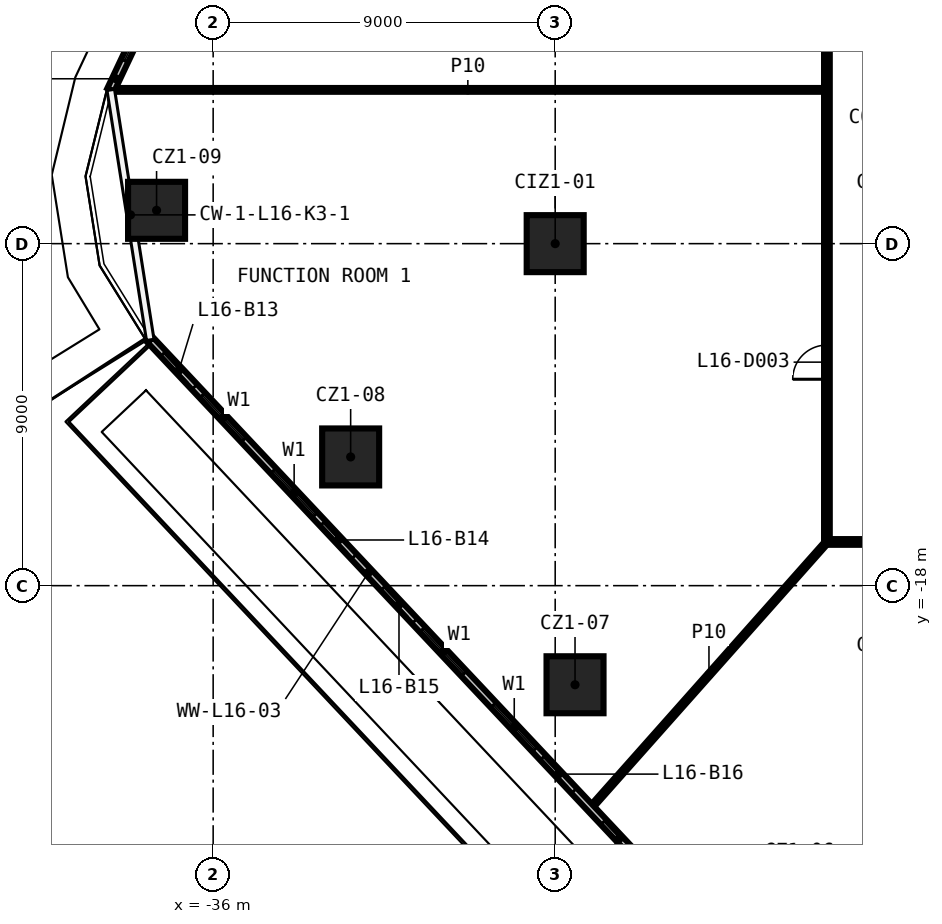
"""IFC4 building model, lengths in metres.
Left out: names, types, materials, properties, quantities, classifications, styles, units other than length and angle.
Written with IfcOpenShell. Run it as: python <this file> out.ifc"""

import sys

from ifc_helpers import new_model, si_unit, direction, frame, frame_2d, origin, origin_2d, place, context, subcontext, project, spatial, rectangle, extrude, element, fill, save


model = new_model("IFC4")
c1 = context("Model", 3, precision=1e-05, world=origin(), true_north=direction((0.0, 1.0)))
c2 = subcontext(c1, "Body", "Model", "MODEL_VIEW")
j1 = project(units=[si_unit("LENGTHUNIT", "METRE"), si_unit("PLANEANGLEUNIT", "RADIAN")], contexts=[c1])
p1 = place(None, origin())
s1 = spatial("IfcSite", under=j1, at=p1, CompositionType="ELEMENT")
p2 = place(p1, origin())
s2 = spatial("IfcBuilding", under=s1, at=p2, CompositionType="ELEMENT")
p3 = place(p2, frame((0.0, 0.0, 81.0)))
s3 = spatial("IfcBuildingStorey", under=s2, at=p3, CompositionType="ELEMENT", Elevation=81.0)
for number, where, z_axis, x_axis in (
    (1, (-26.478, -20.608, 0.0), (0.0, 0.0, 1.0), (1.0, 0.0, 0.0)),
    (2, (-32.382, -14.613, 0.0), (0.0, 0.0, 1.0), (1.0, 0.0, 0.0)),
    (3, (-37.489, -8.123, 0.0), (0.0, 0.0, 1.0), (1.0, 0.0, 0.0)),
    (4, (-27.0, -9.0, 0.0), (0.0, 0.0, 1.0), (1.0, 0.0, 0.0)),
):
    element("IfcColumn", number, at=place(p3, frame(where, z_axis=z_axis, x_axis=x_axis)), inside=s3, PredefinedType="COLUMN", context=c2, shape_type="SweptSolid", body=[
        extrude(rectangle(XDim=1.5, YDim=1.5, at=origin_2d()), origin(), (0.0, 0.0, 1.0), 3.3),
    ])
p4 = place(p3, frame((19.925, -16.85, 0.0), z_axis=(0.0, 0.0, 1.0), x_axis=(-1.0, 0.0, 0.0)))
e5 = element("IfcWall", 5, at=p4, inside=s3, PredefinedType="PARTITIONING", context=c2, shape_type="SweptSolid", body=[
    extrude(rectangle(XDim=39.85, YDim=0.15, at=frame_2d((19.925, 0.0))), origin(), (0.0, 0.0, 1.0), 3.3),
])
p5 = place(p4, frame((35.06, 0.0, 0.0)))
e6 = element("IfcOpeningElement", 6, at=p5, cuts=e5, PredefinedType="OPENING", context=c2, shape_type="SweptSolid", body=[
    extrude(rectangle(XDim=0.9, YDim=2.1, at=frame_2d((0.45, 1.05))), frame((0.0, 0.085, 0.0), z_axis=(0.0, -1.0, 0.0), x_axis=(1.0, 0.0, 0.0)), (0.0, 0.0, 1.0), 0.17),
])
p6 = place(p4, frame((30.967, 0.0, 0.0)))
e7 = element("IfcOpeningElement", 7, at=p6, cuts=e5, PredefinedType="OPENING", context=c2, shape_type="SweptSolid", body=[
    extrude(rectangle(XDim=1.0, YDim=2.1, at=frame_2d((0.5, 1.05))), frame((0.0, 0.085, 0.0), z_axis=(0.0, -1.0, 0.0), x_axis=(1.0, 0.0, 0.0)), (0.0, 0.0, 1.0), 0.17),
])
p7 = place(p4, frame((21.934, 0.0, 0.0)))
e8 = element("IfcOpeningElement", 8, at=p7, cuts=e5, PredefinedType="OPENING", context=c2, shape_type="SweptSolid", body=[
    extrude(rectangle(XDim=0.9, YDim=2.1, at=frame_2d((0.45, 1.05))), frame((0.0, 0.085, 0.0), z_axis=(0.0, -1.0, 0.0), x_axis=(1.0, 0.0, 0.0)), (0.0, 0.0, 1.0), 0.17),
])
p8 = place(p4, frame((3.879, 0.0, 0.0)))
e9 = element("IfcOpeningElement", 9, at=p8, cuts=e5, PredefinedType="OPENING", context=c2, shape_type="SweptSolid", body=[
    extrude(rectangle(XDim=0.9, YDim=2.1, at=frame_2d((0.45, 1.05))), frame((0.0, 0.085, 0.0), z_axis=(0.0, -1.0, 0.0), x_axis=(1.0, 0.0, 0.0)), (0.0, 0.0, 1.0), 0.17),
])
p9 = place(p3, frame((-38.672, -4.954, 0.0), z_axis=(0.0, 0.0, 1.0), x_axis=(1.0, 0.0, 0.0)))
e10 = element("IfcWall", 10, at=p9, inside=s3, PredefinedType="PARTITIONING", context=c2, shape_type="SweptSolid", body=[
    extrude(rectangle(XDim=18.747, YDim=0.1, at=frame_2d((9.374, 0.0))), origin(), (0.0, 0.0, 1.0), 3.3),
])
p10 = place(p3, frame((-26.058, -23.84, 0.0), z_axis=(0.0, 0.0, 1.0), x_axis=(0.664057412605, 0.747681585145, 0.0)))
e11 = element("IfcWall", 11, at=p10, inside=s3, PredefinedType="PARTITIONING", context=c2, shape_type="SweptSolid", body=[
    extrude(rectangle(XDim=9.348, YDim=0.1, at=frame_2d((4.674, 0.0))), origin(), (0.0, 0.0, 1.0), 3.3),
])
p11 = place(p3, frame((-19.85, -16.775, 0.0), z_axis=(0.0, 0.0, 1.0), x_axis=(0.0, 1.0, 0.0)))
e12 = element("IfcWall", 12, at=p11, inside=s3, PredefinedType="PARTITIONING", context=c2, shape_type="SweptSolid", body=[
    extrude(rectangle(XDim=33.55, YDim=0.15, at=frame_2d((16.775, 0.0))), origin(), (0.0, 0.0, 1.0), 3.3),
])
p12 = place(p11, frame((13.332, 0.0, 0.0)))
e13 = element("IfcOpeningElement", 13, at=p12, cuts=e12, PredefinedType="OPENING", context=c2, shape_type="SweptSolid", body=[
    extrude(rectangle(XDim=1.0, YDim=2.1, at=frame_2d((0.5, 1.05))), frame((0.0, 0.085, 0.0), z_axis=(0.0, -1.0, 0.0), x_axis=(1.0, 0.0, 0.0)), (0.0, 0.0, 1.0), 0.17),
])
p13 = place(p11, frame((4.207, 0.0, 0.0)))
e14 = element("IfcOpeningElement", 14, at=p13, cuts=e12, PredefinedType="OPENING", context=c2, shape_type="SweptSolid", body=[
    extrude(rectangle(XDim=0.9, YDim=2.1, at=frame_2d((0.45, 1.05))), frame((0.0, 0.085, 0.0), z_axis=(0.0, -1.0, 0.0), x_axis=(1.0, 0.0, 0.0)), (0.0, 0.0, 1.0), 0.17),
])
p14 = place(p11, frame((21.389, 0.0, 0.0)))
e15 = element("IfcOpeningElement", 15, at=p14, cuts=e12, PredefinedType="OPENING", context=c2, shape_type="SweptSolid", body=[
    extrude(rectangle(XDim=1.0, YDim=2.1, at=frame_2d((0.5, 1.05))), frame((0.0, 0.085, 0.0), z_axis=(0.0, -1.0, 0.0), x_axis=(1.0, 0.0, 0.0)), (0.0, 0.0, 1.0), 0.17),
])
p15 = place(p3, frame((-36.794, -0.933, 0.0), z_axis=(0.0, 0.0, 1.0), x_axis=(-0.427189555154, -0.904162089433, 0.0)))
e16 = element("IfcWall", 16, at=p15, inside=s3, PredefinedType="SOLIDWALL", context=c2, shape_type="SweptSolid", body=[
    extrude(rectangle(XDim=4.448, YDim=0.2, at=frame_2d((2.224, 0.0))), origin(), (0.0, 0.0, 1.0), 3.3),
])
p16 = place(p15, frame((2.0, 0.0, 0.6)))
e17 = element("IfcOpeningElement", 17, at=p16, cuts=e16, PredefinedType="OPENING", context=c2, shape_type="SweptSolid", body=[
    extrude(rectangle(XDim=1.6, YDim=2.4, at=frame_2d((0.8, 1.2))), frame((0.0, 0.11, 0.0), z_axis=(0.0, -1.0, 0.0), x_axis=(1.0, 0.0, 0.0)), (0.0, 0.0, 1.0), 0.22),
])
p17 = place(p15, frame((0.5, 0.0, 0.0)))
e18 = element("IfcOpeningElement", 18, at=p17, cuts=e16, PredefinedType="OPENING", context=c2, shape_type="SweptSolid", body=[
    extrude(rectangle(XDim=1.2, YDim=2.4, at=frame_2d((0.6, 1.2))), frame((0.0, 0.11, 0.0), z_axis=(0.0, -1.0, 0.0), x_axis=(1.0, 0.0, 0.0)), (0.0, 0.0, 1.0), 0.22),
])
p18 = place(p3, frame((-37.656, -11.532, 0.0), z_axis=(0.0, 0.0, 1.0), x_axis=(0.684960405986, -0.728580292234, 0.0)))
e19 = element("IfcWall", 19, at=p18, inside=s3, PredefinedType="SOLIDWALL", context=c2, shape_type="SweptSolid", body=[
    extrude(rectangle(XDim=21.14, YDim=0.2, at=frame_2d((10.57, 0.0))), origin(), (0.0, 0.0, 1.0), 3.3),
])
p19 = place(p18, frame((2.0, 0.0, 0.6)))
e20 = element("IfcOpeningElement", 20, at=p19, cuts=e19, PredefinedType="OPENING", context=c2, shape_type="SweptSolid", body=[
    extrude(rectangle(XDim=1.6, YDim=2.4, at=frame_2d((0.8, 1.2))), frame((0.0, 0.11, 0.0), z_axis=(0.0, -1.0, 0.0), x_axis=(1.0, 0.0, 0.0)), (0.0, 0.0, 1.0), 0.22),
])
p20 = place(p18, frame((0.5, 0.0, 0.0)))
e21 = element("IfcOpeningElement", 21, at=p20, cuts=e19, PredefinedType="OPENING", context=c2, shape_type="SweptSolid", body=[
    extrude(rectangle(XDim=1.2, YDim=2.4, at=frame_2d((0.6, 1.2))), frame((0.0, 0.11, 0.0), z_axis=(0.0, -1.0, 0.0), x_axis=(1.0, 0.0, 0.0)), (0.0, 0.0, 1.0), 0.22),
])
p21 = place(p18, frame((4.728, 0.0, 0.6)))
e22 = element("IfcOpeningElement", 22, at=p21, cuts=e19, PredefinedType="OPENING", context=c2, shape_type="SweptSolid", body=[
    extrude(rectangle(XDim=1.6, YDim=2.4, at=frame_2d((0.8, 1.2))), frame((0.0, 0.11, 0.0), z_axis=(0.0, -1.0, 0.0), x_axis=(1.0, 0.0, 0.0)), (0.0, 0.0, 1.0), 0.22),
])
p22 = place(p18, frame((6.628, 0.0, 0.0)))
e23 = element("IfcOpeningElement", 23, at=p22, cuts=e19, PredefinedType="OPENING", context=c2, shape_type="SweptSolid", body=[
    extrude(rectangle(XDim=1.2, YDim=2.4, at=frame_2d((0.6, 1.2))), frame((0.0, 0.11, 0.0), z_axis=(0.0, -1.0, 0.0), x_axis=(1.0, 0.0, 0.0)), (0.0, 0.0, 1.0), 0.22),
])
p23 = place(p18, frame((10.456, 0.0, 0.6)))
e24 = element("IfcOpeningElement", 24, at=p23, cuts=e19, PredefinedType="OPENING", context=c2, shape_type="SweptSolid", body=[
    extrude(rectangle(XDim=1.6, YDim=2.4, at=frame_2d((0.8, 1.2))), frame((0.0, 0.11, 0.0), z_axis=(0.0, -1.0, 0.0), x_axis=(1.0, 0.0, 0.0)), (0.0, 0.0, 1.0), 0.22),
])
p24 = place(p18, frame((8.956, 0.0, 0.0)))
e25 = element("IfcOpeningElement", 25, at=p24, cuts=e19, PredefinedType="OPENING", context=c2, shape_type="SweptSolid", body=[
    extrude(rectangle(XDim=1.2, YDim=2.4, at=frame_2d((0.6, 1.2))), frame((0.0, 0.11, 0.0), z_axis=(0.0, -1.0, 0.0), x_axis=(1.0, 0.0, 0.0)), (0.0, 0.0, 1.0), 0.22),
])
p25 = place(p18, frame((13.184, 0.0, 0.6)))
e26 = element("IfcOpeningElement", 26, at=p25, cuts=e19, PredefinedType="OPENING", context=c2, shape_type="SweptSolid", body=[
    extrude(rectangle(XDim=1.6, YDim=2.4, at=frame_2d((0.8, 1.2))), frame((0.0, 0.11, 0.0), z_axis=(0.0, -1.0, 0.0), x_axis=(1.0, 0.0, 0.0)), (0.0, 0.0, 1.0), 0.22),
])
p26 = place(p18, frame((15.084, 0.0, 0.0)))
e27 = element("IfcOpeningElement", 27, at=p26, cuts=e19, PredefinedType="OPENING", context=c2, shape_type="SweptSolid", body=[
    extrude(rectangle(XDim=1.2, YDim=2.4, at=frame_2d((0.6, 1.2))), frame((0.0, 0.11, 0.0), z_axis=(0.0, -1.0, 0.0), x_axis=(1.0, 0.0, 0.0)), (0.0, 0.0, 1.0), 0.22),
])
p27 = place(p18, frame((18.912, 0.0, 0.6)))
e28 = element("IfcOpeningElement", 28, at=p27, cuts=e19, PredefinedType="OPENING", context=c2, shape_type="SweptSolid", body=[
    extrude(rectangle(XDim=1.6, YDim=2.4, at=frame_2d((0.8, 1.2))), frame((0.0, 0.11, 0.0), z_axis=(0.0, -1.0, 0.0), x_axis=(1.0, 0.0, 0.0)), (0.0, 0.0, 1.0), 0.22),
])
p28 = place(p18, frame((17.412, 0.0, 0.0)))
e29 = element("IfcOpeningElement", 29, at=p28, cuts=e19, PredefinedType="OPENING", context=c2, shape_type="SweptSolid", body=[
    extrude(rectangle(XDim=1.2, YDim=2.4, at=frame_2d((0.6, 1.2))), frame((0.0, 0.11, 0.0), z_axis=(0.0, -1.0, 0.0), x_axis=(1.0, 0.0, 0.0)), (0.0, 0.0, 1.0), 0.22),
])
p29 = place(p13, origin())
e30 = element("IfcDoor", 30, at=p29, inside=s3, OperationType="SINGLE_SWING_LEFT", PredefinedType="DOOR", context=c2, shape_type="SweptSolid", body=[
    extrude(rectangle(XDim=0.9, YDim=2.1, at=frame_2d((0.45, 1.05))), frame((0.0, 0.025, 0.0), z_axis=(0.0, -1.0, 0.0), x_axis=(1.0, 0.0, 0.0)), (0.0, 0.0, 1.0), 0.05),
])
fill(e14, e30)
p30 = place(p16, origin())
e31 = element("IfcWindow", 31, at=p30, inside=s3, PartitioningType="SINGLE_PANEL", PredefinedType="WINDOW", context=c2, shape_type="SweptSolid", body=[
    extrude(rectangle(XDim=1.6, YDim=2.4, at=frame_2d((0.8, 1.2))), frame((0.0, 0.03, 0.0), z_axis=(0.0, -1.0, 0.0), x_axis=(1.0, 0.0, 0.0)), (0.0, 0.0, 1.0), 0.06),
])
fill(e17, e31)
p31 = place(p19, origin())
e32 = element("IfcWindow", 32, at=p31, inside=s3, PartitioningType="SINGLE_PANEL", PredefinedType="WINDOW", context=c2, shape_type="SweptSolid", body=[
    extrude(rectangle(XDim=1.6, YDim=2.4, at=frame_2d((0.8, 1.2))), frame((0.0, 0.03, 0.0), z_axis=(0.0, -1.0, 0.0), x_axis=(1.0, 0.0, 0.0)), (0.0, 0.0, 1.0), 0.06),
])
fill(e20, e32)
p32 = place(p20, origin())
e33 = element("IfcDoor", 33, at=p32, inside=s3, OperationType="SLIDING_TO_LEFT", PredefinedType="DOOR", context=c2, shape_type="SweptSolid", body=[
    extrude(rectangle(XDim=1.2, YDim=2.4, at=frame_2d((0.6, 1.2))), frame((0.0, 0.025, 0.0), z_axis=(0.0, -1.0, 0.0), x_axis=(1.0, 0.0, 0.0)), (0.0, 0.0, 1.0), 0.05),
])
fill(e21, e33)
p33 = place(p21, origin())
e34 = element("IfcWindow", 34, at=p33, inside=s3, PartitioningType="SINGLE_PANEL", PredefinedType="WINDOW", context=c2, shape_type="SweptSolid", body=[
    extrude(rectangle(XDim=1.6, YDim=2.4, at=frame_2d((0.8, 1.2))), frame((0.0, 0.03, 0.0), z_axis=(0.0, -1.0, 0.0), x_axis=(1.0, 0.0, 0.0)), (0.0, 0.0, 1.0), 0.06),
])
fill(e22, e34)
p34 = place(p22, origin())
e35 = element("IfcDoor", 35, at=p34, inside=s3, OperationType="SLIDING_TO_LEFT", PredefinedType="DOOR", context=c2, shape_type="SweptSolid", body=[
    extrude(rectangle(XDim=1.2, YDim=2.4, at=frame_2d((0.6, 1.2))), frame((0.0, 0.025, 0.0), z_axis=(0.0, -1.0, 0.0), x_axis=(1.0, 0.0, 0.0)), (0.0, 0.0, 1.0), 0.05),
])
fill(e23, e35)
p35 = place(p23, origin())
e36 = element("IfcWindow", 36, at=p35, inside=s3, PartitioningType="SINGLE_PANEL", PredefinedType="WINDOW", context=c2, shape_type="SweptSolid", body=[
    extrude(rectangle(XDim=1.6, YDim=2.4, at=frame_2d((0.8, 1.2))), frame((0.0, 0.03, 0.0), z_axis=(0.0, -1.0, 0.0), x_axis=(1.0, 0.0, 0.0)), (0.0, 0.0, 1.0), 0.06),
])
fill(e24, e36)
p36 = place(p24, origin())
e37 = element("IfcDoor", 37, at=p36, inside=s3, OperationType="SLIDING_TO_LEFT", PredefinedType="DOOR", context=c2, shape_type="SweptSolid", body=[
    extrude(rectangle(XDim=1.2, YDim=2.4, at=frame_2d((0.6, 1.2))), frame((0.0, 0.025, 0.0), z_axis=(0.0, -1.0, 0.0), x_axis=(1.0, 0.0, 0.0)), (0.0, 0.0, 1.0), 0.05),
])
fill(e25, e37)
p37 = place(p25, origin())
e38 = element("IfcWindow", 38, at=p37, inside=s3, PartitioningType="SINGLE_PANEL", PredefinedType="WINDOW", context=c2, shape_type="SweptSolid", body=[
    extrude(rectangle(XDim=1.6, YDim=2.4, at=frame_2d((0.8, 1.2))), frame((0.0, 0.03, 0.0), z_axis=(0.0, -1.0, 0.0), x_axis=(1.0, 0.0, 0.0)), (0.0, 0.0, 1.0), 0.06),
])
fill(e26, e38)
p38 = place(p26, origin())
e39 = element("IfcDoor", 39, at=p38, inside=s3, OperationType="SLIDING_TO_LEFT", PredefinedType="DOOR", context=c2, shape_type="SweptSolid", body=[
    extrude(rectangle(XDim=1.2, YDim=2.4, at=frame_2d((0.6, 1.2))), frame((0.0, 0.025, 0.0), z_axis=(0.0, -1.0, 0.0), x_axis=(1.0, 0.0, 0.0)), (0.0, 0.0, 1.0), 0.05),
])
fill(e27, e39)
p39 = place(p28, origin())
e40 = element("IfcDoor", 40, at=p39, inside=s3, OperationType="SLIDING_TO_LEFT", PredefinedType="DOOR", context=c2, shape_type="SweptSolid", body=[
    extrude(rectangle(XDim=1.2, YDim=2.4, at=frame_2d((0.6, 1.2))), frame((0.0, 0.025, 0.0), z_axis=(0.0, -1.0, 0.0), x_axis=(1.0, 0.0, 0.0)), (0.0, 0.0, 1.0), 0.05),
])
fill(e29, e40)
save(model, sys.argv[1])
